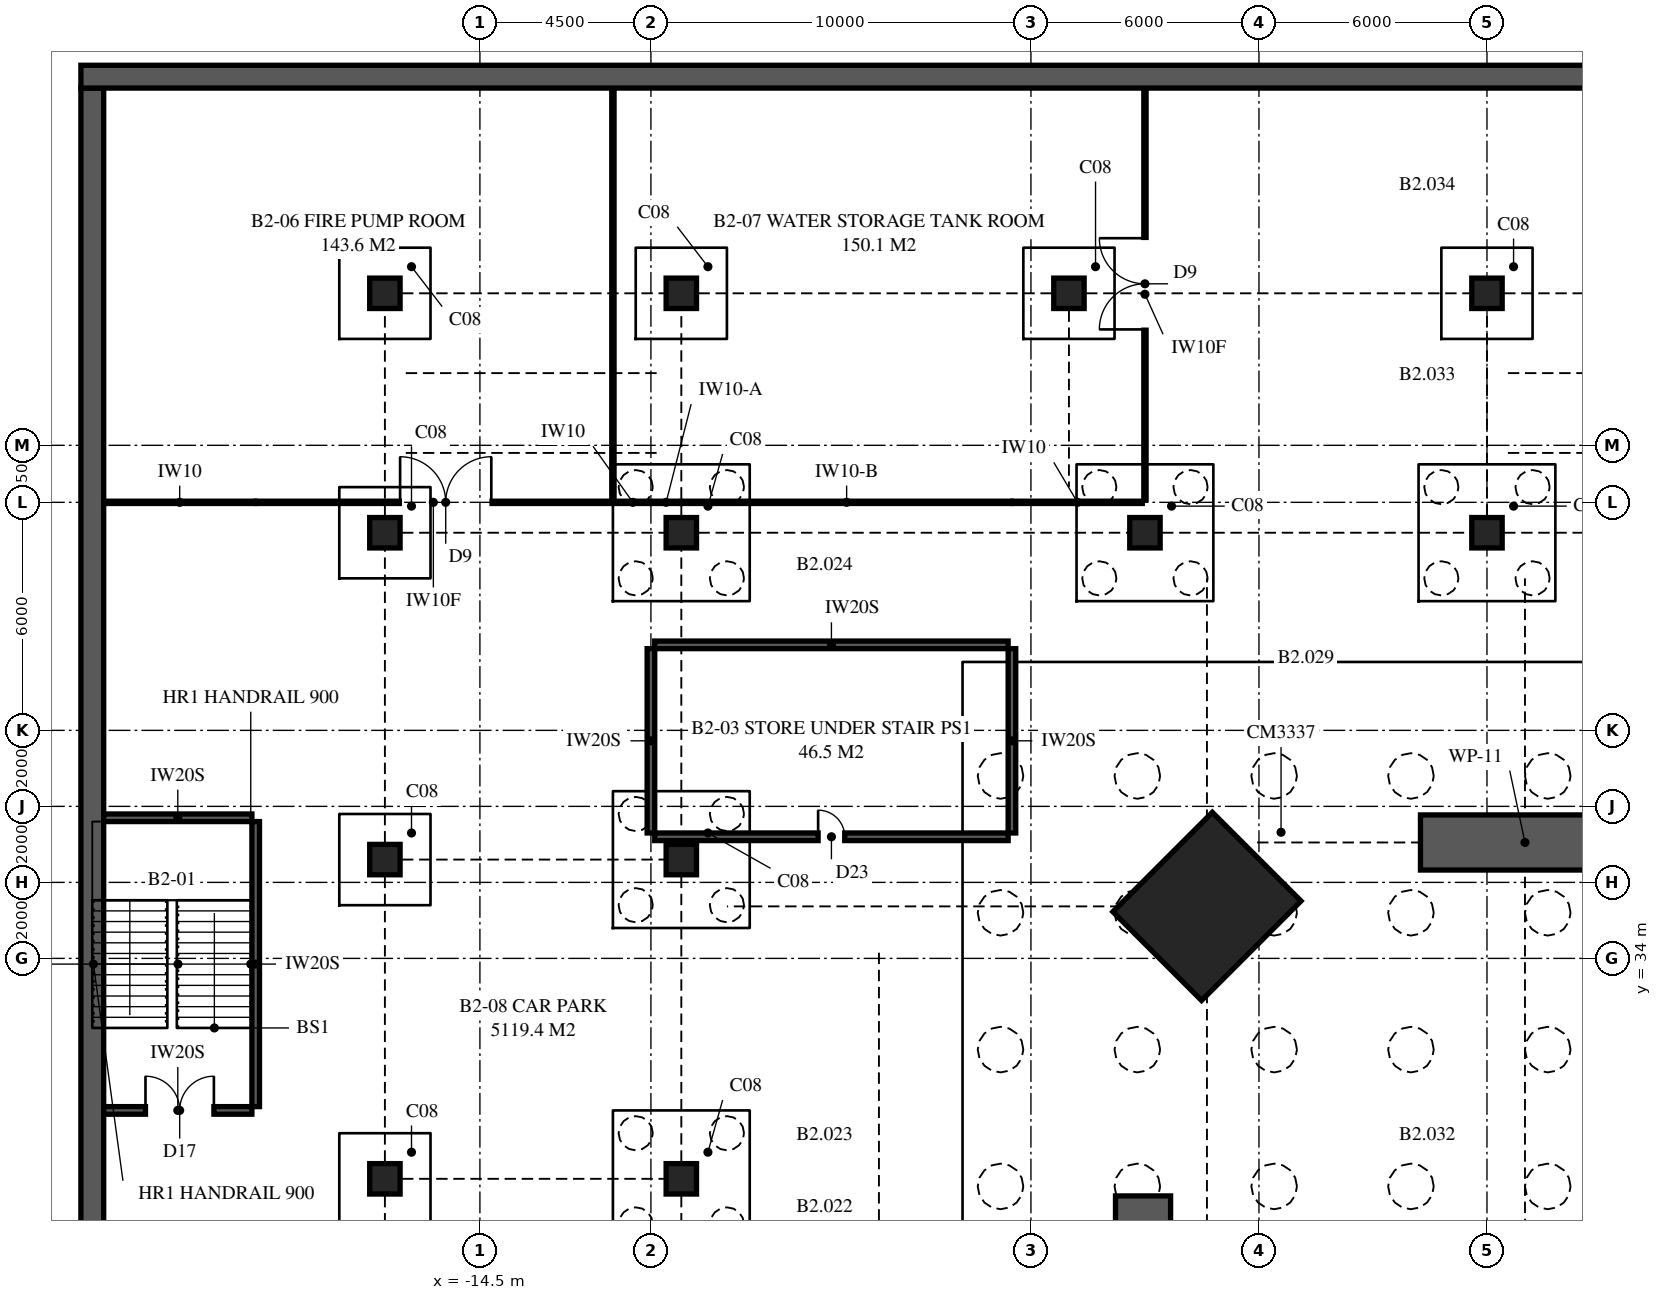
"""IFC4 building model, lengths in metres.
Left out: names, types, materials, properties, quantities, classifications, styles, units other than length and angle.
Written with IfcOpenShell. Run it as: python <this file> out.ifc"""

import sys

from ifc_helpers import new_model, si_unit, direction, frame, frame_2d, origin, origin_2d, place, context, subcontext, project, spatial, polyline, rectangle, outline, extrude, element, fill, save


model = new_model("IFC4")
c1 = context("Model", 3, precision=1e-05, world=origin(), true_north=direction((0.0, 1.0)))
c2 = subcontext(c1, "Body", "Model", "MODEL_VIEW")
j1 = project(units=[si_unit("LENGTHUNIT", "METRE"), si_unit("PLANEANGLEUNIT", "RADIAN")], contexts=[c1])
p1 = place(None, origin())
s1 = spatial("IfcSite", under=j1, at=p1, CompositionType="ELEMENT")
p2 = place(p1, origin())
s2 = spatial("IfcBuilding", under=s1, at=p2, CompositionType="ELEMENT")
p3 = place(p2, frame((0.0, 0.0, -7.5)))
s3 = spatial("IfcBuildingStorey", under=s2, at=p3, CompositionType="ELEMENT", Elevation=-7.5)
p4 = place(p3, frame((75.0, 57.2, 0.0), z_axis=(0.0, 0.0, 1.0), x_axis=(-1.0, 0.0, 0.0)))
e1 = element("IfcWall", 1, at=p4, inside=s3, PredefinedType="SOLIDWALL", context=c2, shape_type="SweptSolid", body=[
    extrude(rectangle(XDim=100.0, YDim=0.6, at=frame_2d((50.0, 0.0))), origin(), (0.0, 0.0, 1.0), 3.5),
])
p5 = place(p3, frame((-24.7, 56.9, 0.0), z_axis=(0.0, 0.0, 1.0), x_axis=(0.0, -1.0, 0.0)))
e2 = element("IfcWall", 2, at=p5, inside=s3, PredefinedType="SOLIDWALL", context=c2, shape_type="SweptSolid", body=[
    extrude(rectangle(XDim=73.8, YDim=0.6, at=frame_2d((36.9, 0.0))), origin(), (0.0, 0.0, 1.0), 3.5),
])
p6 = place(p3, frame((4.631, 35.369, -0.6), z_axis=(0.0, 0.0, 1.0), x_axis=(0.707106781187, -0.707106781187, 0.0)))
e3 = element("IfcColumn", 3, at=p6, inside=s3, PredefinedType="COLUMN", context=c2, shape_type="SweptSolid", body=[
    extrude(rectangle(XDim=3.3, YDim=3.7, at=origin_2d()), origin(), (0.0, 0.0, 1.0), 4.1),
])
for number, where, z_axis, x_axis in (
    (4, (-9.2, 28.2, -0.6), (0.0, 0.0, 1.0), (1.0, 0.0, 0.0)),
    (5, (-9.2, 36.6, -0.6), (0.0, 0.0, 1.0), (1.0, 0.0, 0.0)),
    (6, (-9.2, 45.2, -0.6), (0.0, 0.0, 1.0), (1.0, 0.0, 0.0)),
    (7, (3.0, 45.2, -0.6), (0.0, 0.0, 1.0), (1.0, 0.0, 0.0)),
    (8, (12.0, 45.2, -0.6), (0.0, 0.0, 1.0), (1.0, 0.0, 0.0)),
    (9, (-17.0, 28.2, -0.6), (0.0, 0.0, 1.0), (1.0, 0.0, 0.0)),
    (10, (-17.0, 36.6, -0.6), (0.0, 0.0, 1.0), (1.0, 0.0, 0.0)),
    (11, (-17.0, 45.2, -0.6), (0.0, 0.0, 1.0), (1.0, 0.0, 0.0)),
    (12, (-17.0, 51.5, -0.6), (0.0, 0.0, 1.0), (1.0, 0.0, 0.0)),
    (13, (-9.2, 51.5, -0.6), (0.0, 0.0, 1.0), (1.0, 0.0, 0.0)),
    (14, (1.0, 51.5, -0.6), (0.0, 0.0, 1.0), (1.0, 0.0, 0.0)),
    (15, (12.0, 51.5, -0.6), (0.0, 0.0, 1.0), (1.0, 0.0, 0.0)),
):
    element("IfcColumn", number, at=place(p3, frame(where, z_axis=z_axis, x_axis=x_axis)), inside=s3, PredefinedType="COLUMN", context=c2, shape_type="SweptSolid", body=[
        extrude(rectangle(XDim=0.8, YDim=0.8, at=origin_2d()), origin(), (0.0, 0.0, 1.0), 4.1),
    ])
p7 = place(p3, frame((3.0, 46.05, 0.0), z_axis=(0.0, 0.0, 1.0), x_axis=(0.0, 1.0, 0.0)))
e16 = element("IfcWall", 16, at=p7, inside=s3, PredefinedType="PARTITIONING", context=c2, shape_type="SweptSolid", body=[
    extrude(outline(polyline([(0.0, 0.0), (10.85, 0.0), (10.85, 3.26), (6.01, 3.26), (6.01, 2.66), (4.89, 2.66), (4.89, 3.26), (0.41, 3.26), (0.41, 2.66), (0.0, 2.66), (0.0, 3.26), (0.0, 0.0)])), frame((0.0, 0.05, 0.0), z_axis=(0.0, -1.0, 0.0), x_axis=(1.0, 0.0, 0.0)), (0.0, 0.0, 1.0), 0.1),
])
p8 = place(p7, frame((4.5, 0.0, 0.0)))
e17 = element("IfcOpeningElement", 17, at=p8, cuts=e16, PredefinedType="OPENING", context=c2, shape_type="SweptSolid", body=[
    extrude(rectangle(XDim=2.4, YDim=2.4, at=frame_2d((1.2, 1.2))), frame((0.0, 0.06, 0.0), z_axis=(0.0, -1.0, 0.0), x_axis=(1.0, 0.0, 0.0)), (0.0, 0.0, 1.0), 0.12),
])
p9 = place(p3, frame((-20.4, 30.1, 0.0), z_axis=(0.0, 0.0, 1.0), x_axis=(0.0, 1.0, 0.0)))
e18 = element("IfcWall", 18, at=p9, inside=s3, PredefinedType="SOLIDWALL", context=c2, shape_type="SweptSolid", body=[
    extrude(rectangle(XDim=7.5, YDim=0.2, at=frame_2d((3.75, 0.0))), origin(), (0.0, 0.0, 1.0), 3.5),
])
p10 = place(p3, frame((-10.0, 37.3, 0.0), z_axis=(0.0, 0.0, 1.0), x_axis=(0.0, 1.0, 0.0)))
e19 = element("IfcWall", 19, at=p10, inside=s3, PredefinedType="SOLIDWALL", context=c2, shape_type="SweptSolid", body=[
    extrude(rectangle(XDim=4.85, YDim=0.2, at=frame_2d((2.425, 0.0))), origin(), (0.0, 0.0, 1.0), 3.5),
])
p11 = place(p3, frame((-20.4, 46.0, 0.0), z_axis=(0.0, 0.0, 1.0), x_axis=(1.0, 0.0, 0.0)))
e20 = element("IfcWall", 20, at=p11, inside=s3, PredefinedType="PARTITIONING", context=c2, shape_type="SweptSolid", body=[
    extrude(outline(polyline([(0.0, 0.0), (9.35, 0.0), (9.35, 3.26), (4.01, 3.26), (4.01, 2.66), (2.79, 2.66), (2.79, 3.26), (0.0, 3.26), (0.0, 0.0)])), frame((0.0, 0.05, 0.0), z_axis=(0.0, -1.0, 0.0), x_axis=(1.0, 0.0, 0.0)), (0.0, 0.0, 1.0), 0.1),
])
p12 = place(p11, frame((3.8, 0.0, 0.0)))
e21 = element("IfcOpeningElement", 21, at=p12, cuts=e20, PredefinedType="OPENING", context=c2, shape_type="SweptSolid", body=[
    extrude(rectangle(XDim=2.4, YDim=2.4, at=frame_2d((1.2, 1.2))), frame((0.0, 0.06, 0.0), z_axis=(0.0, -1.0, 0.0), x_axis=(1.0, 0.0, 0.0)), (0.0, 0.0, 1.0), 0.12),
])
p13 = place(p3, frame((-10.95, 46.0, 0.0), z_axis=(0.0, 0.0, 1.0), x_axis=(1.0, 0.0, 0.0)))
e22 = element("IfcWall", 22, at=p13, inside=s3, PredefinedType="PARTITIONING", context=c2, shape_type="SweptSolid", body=[
    extrude(rectangle(XDim=0.95, YDim=0.1, at=frame_2d((0.475, 0.0))), origin(), (0.0, 0.0, 1.0), 3.26),
])
p14 = place(p3, frame((-0.5, 37.3, 0.0), z_axis=(0.0, 0.0, 1.0), x_axis=(0.0, 1.0, 0.0)))
e23 = element("IfcWall", 23, at=p14, inside=s3, PredefinedType="SOLIDWALL", context=c2, shape_type="SweptSolid", body=[
    extrude(rectangle(XDim=4.85, YDim=0.2, at=frame_2d((2.425, 0.0))), origin(), (0.0, 0.0, 1.0), 3.5),
])
p15 = place(p3, frame((-0.5, 46.0, 0.0), z_axis=(0.0, 0.0, 1.0), x_axis=(1.0, 0.0, 0.0)))
e24 = element("IfcWall", 24, at=p15, inside=s3, PredefinedType="PARTITIONING", context=c2, shape_type="SweptSolid", body=[
    extrude(outline(polyline([(0.0, 0.0), (3.45, 0.0), (3.45, 3.26), (3.45, 2.66), (0.0, 2.66), (0.0, 3.26), (0.0, 0.0)])), frame((0.0, 0.05, 0.0), z_axis=(0.0, -1.0, 0.0), x_axis=(1.0, 0.0, 0.0)), (0.0, 0.0, 1.0), 0.1),
])
p16 = place(p3, frame((-9.9, 37.2, 0.0), z_axis=(0.0, 0.0, 1.0), x_axis=(1.0, 0.0, 0.0)))
e25 = element("IfcWall", 25, at=p16, inside=s3, PredefinedType="SOLIDWALL", context=c2, shape_type="SweptSolid", body=[
    extrude(rectangle(XDim=9.3, YDim=0.2, at=frame_2d((4.65, 0.0))), origin(), (0.0, 0.0, 1.0), 3.5),
])
p17 = place(p16, frame((4.3, 0.0, 0.0)))
e26 = element("IfcOpeningElement", 26, at=p17, cuts=e25, PredefinedType="OPENING", context=c2, shape_type="SweptSolid", body=[
    extrude(rectangle(XDim=0.7, YDim=2.1, at=frame_2d((0.35, 1.05))), frame((0.0, 0.11, 0.0), z_axis=(0.0, -1.0, 0.0), x_axis=(1.0, 0.0, 0.0)), (0.0, 0.0, 1.0), 0.22),
])
p18 = place(p3, frame((-9.9, 42.25, 0.0), z_axis=(0.0, 0.0, 1.0), x_axis=(1.0, 0.0, 0.0)))
e27 = element("IfcWall", 27, at=p18, inside=s3, PredefinedType="SOLIDWALL", context=c2, shape_type="SweptSolid", body=[
    extrude(rectangle(XDim=9.3, YDim=0.2, at=frame_2d((4.65, 0.0))), origin(), (0.0, 0.0, 1.0), 3.5),
])
p19 = place(p3, frame((-10.0, 46.0, 0.0), z_axis=(0.0, 0.0, 1.0), x_axis=(1.0, 0.0, 0.0)))
e28 = element("IfcWall", 28, at=p19, inside=s3, PredefinedType="PARTITIONING", context=c2, shape_type="SweptSolid", body=[
    extrude(outline(polyline([(0.0, 0.0), (0.8, 0.0), (0.8, 2.66), (0.19, 2.66), (0.19, 3.26), (0.0, 3.26), (0.0, 0.0)])), frame((0.0, 0.05, 0.0), z_axis=(0.0, -1.0, 0.0), x_axis=(1.0, 0.0, 0.0)), (0.0, 0.0, 1.0), 0.1),
])
p20 = place(p3, frame((-9.2, 46.0, 0.0), z_axis=(0.0, 0.0, 1.0), x_axis=(1.0, 0.0, 0.0)))
e29 = element("IfcWall", 29, at=p20, inside=s3, PredefinedType="PARTITIONING", context=c2, shape_type="SweptSolid", body=[
    extrude(rectangle(XDim=8.7, YDim=0.1, at=frame_2d((4.35, 0.0))), origin(), (0.0, 0.0, 1.0), 2.66),
])
p21 = place(p3, frame((-24.4, 30.0, 0.0), z_axis=(0.0, 0.0, 1.0), x_axis=(1.0, 0.0, 0.0)))
e30 = element("IfcWall", 30, at=p21, inside=s3, PredefinedType="SOLIDWALL", context=c2, shape_type="SweptSolid", body=[
    extrude(rectangle(XDim=3.9, YDim=0.2, at=frame_2d((1.95, 0.0))), origin(), (0.0, 0.0, 1.0), 3.5),
])
p22 = place(p21, frame((1.1, 0.0, 0.0)))
e31 = element("IfcOpeningElement", 31, at=p22, cuts=e30, PredefinedType="OPENING", context=c2, shape_type="SweptSolid", body=[
    extrude(rectangle(XDim=1.8, YDim=2.2, at=frame_2d((0.9, 1.1))), frame((0.0, 0.11, 0.0), z_axis=(0.0, -1.0, 0.0), x_axis=(1.0, 0.0, 0.0)), (0.0, 0.0, 1.0), 0.22),
])
p23 = place(p3, frame((-24.4, 37.7, 0.0), z_axis=(0.0, 0.0, 1.0), x_axis=(1.0, 0.0, 0.0)))
e32 = element("IfcWall", 32, at=p23, inside=s3, PredefinedType="SOLIDWALL", context=c2, shape_type="SweptSolid", body=[
    extrude(rectangle(XDim=3.9, YDim=0.2, at=frame_2d((1.95, 0.0))), origin(), (0.0, 0.0, 1.0), 3.5),
])
p24 = place(p3, frame((-24.4, 46.0, 0.0), z_axis=(0.0, 0.0, 1.0), x_axis=(1.0, 0.0, 0.0)))
e33 = element("IfcWall", 33, at=p24, inside=s3, PredefinedType="PARTITIONING", context=c2, shape_type="SweptSolid", body=[
    extrude(rectangle(XDim=4.0, YDim=0.1, at=frame_2d((2.0, 0.0))), origin(), (0.0, 0.0, 1.0), 3.26),
])
p25 = place(p3, frame((-11.0, 46.05, 0.0), z_axis=(0.0, 0.0, 1.0), x_axis=(0.0, 1.0, 0.0)))
e34 = element("IfcWall", 34, at=p25, inside=s3, PredefinedType="PARTITIONING", context=c2, shape_type="SweptSolid", body=[
    extrude(outline(polyline([(0.0, 0.0), (10.85, 0.0), (10.85, 3.26), (6.01, 3.26), (6.01, 2.66), (4.89, 2.66), (4.89, 3.26), (3.86, 3.26), (3.86, 2.76), (2.84, 2.76), (2.84, 3.26), (1.76, 3.26), (1.76, 2.76), (0.74, 2.76), (0.74, 3.26), (0.0, 3.26), (0.0, 0.0)])), frame((0.0, 0.05, 0.0), z_axis=(0.0, -1.0, 0.0), x_axis=(1.0, 0.0, 0.0)), (0.0, 0.0, 1.0), 0.1),
])
for number, where, z_axis, x_axis in (
    (35, (10.25, 37.05, -0.6), (0.0, 0.0, 1.0), (1.0, 0.0, 0.0)),
    (36, (2.95, 22.25, -0.6), (0.0, 0.0, 1.0), (0.0, 1.0, 0.0)),
):
    element("IfcWall", number, at=place(p3, frame(where, z_axis=z_axis, x_axis=x_axis)), inside=s3, PredefinedType="SHEAR", context=c2, shape_type="SweptSolid", body=[
        extrude(rectangle(XDim=5.5, YDim=1.45, at=frame_2d((2.75, 0.0))), origin(), (0.0, 0.0, 1.0), 4.1),
    ])
p26 = place(p12, origin())
e37 = element("IfcDoor", 37, at=p26, inside=s3, OperationType="DOUBLE_DOOR_SINGLE_SWING", PredefinedType="DOOR", context=c2, shape_type="SweptSolid", body=[
    extrude(rectangle(XDim=2.4, YDim=2.4, at=frame_2d((1.2, 1.2))), frame((0.0, 0.025, 0.0), z_axis=(0.0, -1.0, 0.0), x_axis=(1.0, 0.0, 0.0)), (0.0, 0.0, 1.0), 0.05),
])
fill(e21, e37)
p27 = place(p8, origin())
e38 = element("IfcDoor", 38, at=p27, inside=s3, OperationType="DOUBLE_DOOR_SINGLE_SWING", PredefinedType="DOOR", context=c2, shape_type="SweptSolid", body=[
    extrude(rectangle(XDim=2.4, YDim=2.4, at=frame_2d((1.2, 1.2))), frame((0.0, 0.025, 0.0), z_axis=(0.0, -1.0, 0.0), x_axis=(1.0, 0.0, 0.0)), (0.0, 0.0, 1.0), 0.05),
])
fill(e17, e38)
p28 = place(p22, origin())
e39 = element("IfcDoor", 39, at=p28, inside=s3, OperationType="DOUBLE_DOOR_SINGLE_SWING", PredefinedType="DOOR", context=c2, shape_type="SweptSolid", body=[
    extrude(rectangle(XDim=1.8, YDim=2.2, at=frame_2d((0.9, 1.1))), frame((0.0, 0.025, 0.0), z_axis=(0.0, -1.0, 0.0), x_axis=(1.0, 0.0, 0.0)), (0.0, 0.0, 1.0), 0.05),
])
fill(e31, e39)
p29 = place(p17, origin())
e40 = element("IfcDoor", 40, at=p29, inside=s3, OperationType="SINGLE_SWING_LEFT", PredefinedType="DOOR", context=c2, shape_type="SweptSolid", body=[
    extrude(rectangle(XDim=0.7, YDim=2.1, at=frame_2d((0.35, 1.05))), frame((0.0, 0.025, 0.0), z_axis=(0.0, -1.0, 0.0), x_axis=(1.0, 0.0, 0.0)), (0.0, 0.0, 1.0), 0.05),
])
fill(e26, e40)
save(model, sys.argv[1])
